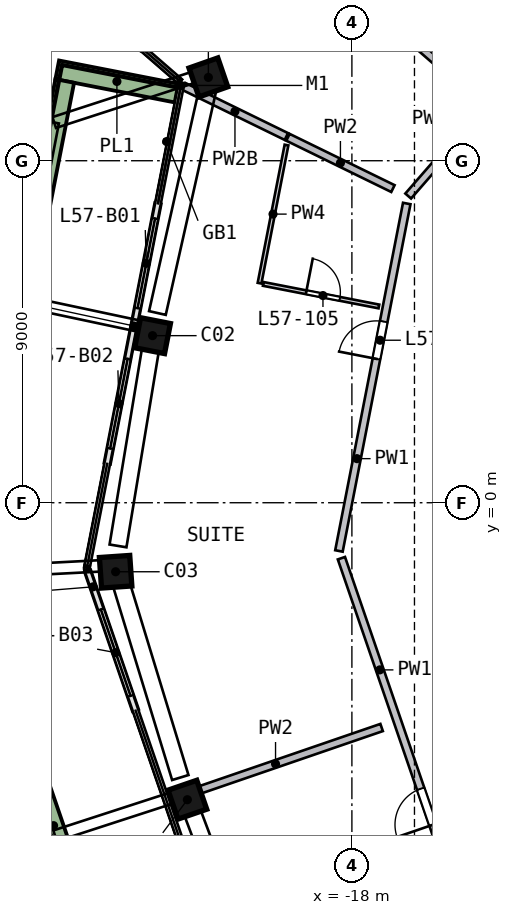
"""IFC4 building model, lengths in metres.
Left out: names, types, materials, properties, quantities, classifications, styles, units other than length and angle.
Written with IfcOpenShell. Run it as: python <this file> out.ifc"""

import sys

from ifc_helpers import new_model, si_unit, direction, frame, frame_2d, origin, origin_2d, place, context, subcontext, project, spatial, rectangle, extrude, element, fill, save


model = new_model("IFC4")
c1 = context("Model", 3, precision=1e-05, world=origin(), true_north=direction((0.0, 1.0)))
c2 = subcontext(c1, "Body", "Model", "MODEL_VIEW")
j1 = project(units=[si_unit("LENGTHUNIT", "METRE"), si_unit("PLANEANGLEUNIT", "RADIAN")], contexts=[c1])
p1 = place(None, origin())
s1 = spatial("IfcSite", under=j1, at=p1, CompositionType="ELEMENT")
p2 = place(p1, origin())
s2 = spatial("IfcBuilding", under=s1, at=p2, CompositionType="ELEMENT")
p3 = place(p2, frame((0.0, 0.0, 234.0)))
s3 = spatial("IfcBuildingStorey", under=s2, at=p3, CompositionType="ELEMENT", Elevation=234.0)
p4 = place(p3, frame((-21.713, 11.318, 0.0), z_axis=(-0.052905921, -0.103683443, 0.993202249), x_axis=(-0.330545328, 0.940345776, 0.080558097)))
e1 = element("IfcColumn", 1, at=p4, inside=s3, PredefinedType="COLUMN", context=c2, shape_type="SweptSolid", body=[
    extrude(rectangle(XDim=0.8, YDim=0.8, at=origin_2d()), origin(), (0.0, 0.0, 1.0), 3.212),
])
p5 = place(p3, frame((-23.22, 4.531, 0.0), z_axis=(-0.020609061, -0.110650124, 0.99364572), x_axis=(-0.190224415, -0.975267855, -0.112549024)))
e2 = element("IfcColumn", 2, at=p5, inside=s3, PredefinedType="COLUMN", context=c2, shape_type="SweptSolid", body=[
    extrude(rectangle(XDim=0.8, YDim=0.8, at=origin_2d()), origin(), (0.0, 0.0, 1.0), 3.21),
])
p6 = place(p3, frame((-24.228, -1.677, 0.0), z_axis=(0.008894671, -0.11509856, 0.993314254), x_axis=(-0.068122893, 0.990975997, 0.115437627)))
e3 = element("IfcColumn", 3, at=p6, inside=s3, PredefinedType="COLUMN", context=c2, shape_type="SweptSolid", body=[
    extrude(rectangle(XDim=0.8, YDim=0.8, at=origin_2d()), origin(), (0.0, 0.0, 1.0), 3.211),
])
p7 = place(p3, frame((-22.375, -7.687, 0.0), z_axis=(0.037491609, -0.106162851, 0.9936417), x_axis=(0.322917335, -0.939706935, -0.112584504)))
e4 = element("IfcColumn", 4, at=p7, inside=s3, PredefinedType="COLUMN", context=c2, shape_type="SweptSolid", body=[
    extrude(rectangle(XDim=0.8, YDim=0.8, at=origin_2d()), origin(), (0.0, 0.0, 1.0), 3.21),
])
p8 = place(p3, frame((-23.104, 7.87, 0.0), z_axis=(0.0, 0.0, 1.0), x_axis=(-0.191532956, -0.981486183, 0.0)))
e5 = element("IfcWall", 5, at=p8, inside=s3, PredefinedType="SOLIDWALL", context=c2, shape_type="SweptSolid", body=[
    extrude(rectangle(XDim=3.3, YDim=0.15, at=frame_2d((1.65, 0.0))), origin(), (0.0, 0.0, 1.0), 2.525),
])
p9 = place(p8, frame((0.4, 0.0, 0.0)))
e6 = element("IfcOpeningElement", 6, at=p9, cuts=e5, PredefinedType="OPENING", context=c2, shape_type="SweptSolid", body=[
    extrude(rectangle(XDim=2.4, YDim=2.4, at=frame_2d((1.2, 1.2))), frame((0.0, 0.085, 0.0), z_axis=(0.0, -1.0, 0.0), x_axis=(1.0, 0.0, 0.0)), (0.0, 0.0, 1.0), 0.17),
])
p10 = place(p3, frame((-23.736, 4.631, 0.0), z_axis=(0.0, 0.0, 1.0), x_axis=(-0.191510359, -0.981490592, 0.0)))
e7 = element("IfcWall", 7, at=p10, inside=s3, PredefinedType="SOLIDWALL", context=c2, shape_type="SweptSolid", body=[
    extrude(rectangle(XDim=3.661, YDim=0.15, at=frame_2d((1.831, 0.0))), origin(), (0.0, 0.0, 1.0), 2.525),
])
p11 = place(p10, frame((0.861, 0.0, 0.0)))
e8 = element("IfcOpeningElement", 8, at=p11, cuts=e7, PredefinedType="OPENING", context=c2, shape_type="SweptSolid", body=[
    extrude(rectangle(XDim=2.4, YDim=2.4, at=frame_2d((1.2, 1.2))), frame((0.0, 0.085, 0.0), z_axis=(0.0, -1.0, 0.0), x_axis=(1.0, 0.0, 0.0)), (0.0, 0.0, 1.0), 0.17),
])
p12 = place(p3, frame((-24.951, -1.805, 0.0), z_axis=(0.0, 0.0, 1.0), x_axis=(0.324897842, -0.945749117, 0.0)))
e9 = element("IfcWall", 9, at=p12, inside=s3, PredefinedType="SOLIDWALL", context=c2, shape_type="SweptSolid", body=[
    extrude(rectangle(XDim=3.863, YDim=0.15, at=frame_2d((1.932, 0.0))), origin(), (0.0, 0.0, 1.0), 2.525),
])
p13 = place(p12, frame((1.063, 0.0, 0.0)))
e10 = element("IfcOpeningElement", 10, at=p13, cuts=e9, PredefinedType="OPENING", context=c2, shape_type="SweptSolid", body=[
    extrude(rectangle(XDim=2.4, YDim=2.4, at=frame_2d((1.2, 1.2))), frame((0.0, 0.085, 0.0), z_axis=(0.0, -1.0, 0.0), x_axis=(1.0, 0.0, 0.0)), (0.0, 0.0, 1.0), 0.17),
])
p14 = place(p3, frame((-22.614, 10.78, 0.0), z_axis=(0.0, 0.0, 1.0), x_axis=(-0.981497239, 0.191476291, 0.0)))
e11 = element("IfcWall", 11, at=p14, inside=s3, PredefinedType="SOLIDWALL", context=c2, shape_type="SweptSolid", body=[
    extrude(rectangle(XDim=3.199, YDim=0.5, at=frame_2d((1.6, 0.0))), origin(), (0.0, 0.0, 1.0), 0.7),
])
p15 = place(p3, frame((-25.556, 11.099, 0.0), z_axis=(0.0, 0.0, 1.0), x_axis=(-0.191494743, -0.981493639, 0.0)))
e12 = element("IfcWall", 12, at=p15, inside=s3, PredefinedType="SOLIDWALL", context=c2, shape_type="SweptSolid", body=[
    extrude(rectangle(XDim=13.223, YDim=0.5, at=frame_2d((6.612, 0.0))), origin(), (0.0, 0.0, 1.0), 0.7),
])
p16 = place(p3, frame((-28.079, -2.009, 0.0), z_axis=(0.0, 0.0, 1.0), x_axis=(0.324897792, -0.945749134, 0.0)))
e13 = element("IfcWall", 13, at=p16, inside=s3, PredefinedType="SOLIDWALL", context=c2, shape_type="SweptSolid", body=[
    extrude(rectangle(XDim=13.724, YDim=0.5, at=frame_2d((6.862, 0.0))), origin(), (0.0, 0.0, 1.0), 0.7),
])
p17 = place(p3, frame((-18.341, -1.269, 0.0), z_axis=(0.0, 0.0, 1.0), x_axis=(0.191492503, 0.981494076, 0.0)))
e14 = element("IfcWall", 14, at=p17, inside=s3, PredefinedType="SOLIDWALL", context=c2, shape_type="SweptSolid", body=[
    extrude(rectangle(XDim=9.316, YDim=0.2, at=frame_2d((4.658, 0.0))), origin(), (0.0, 0.0, 1.0), 3.19),
])
p18 = place(p17, frame((5.15, 0.0, 0.0)))
e15 = element("IfcOpeningElement", 15, at=p18, cuts=e14, PredefinedType="OPENING", context=c2, shape_type="SweptSolid", body=[
    extrude(rectangle(XDim=1.0, YDim=2.1, at=frame_2d((0.5, 1.05))), frame((0.0, 0.11, 0.0), z_axis=(0.0, -1.0, 0.0), x_axis=(1.0, 0.0, 0.0)), (0.0, 0.0, 1.0), 0.22),
])
p19 = place(p3, frame((-15.249, -10.27, 0.0), z_axis=(0.0, 0.0, 1.0), x_axis=(-0.324901791, 0.94574776, 0.0)))
e16 = element("IfcWall", 16, at=p19, inside=s3, PredefinedType="SOLIDWALL", context=c2, shape_type="SweptSolid", body=[
    extrude(rectangle(XDim=9.316, YDim=0.2, at=frame_2d((4.658, 0.0))), origin(), (0.0, 0.0, 1.0), 3.19),
])
p20 = place(p19, frame((1.9, 0.0, 0.0)))
e17 = element("IfcOpeningElement", 17, at=p20, cuts=e16, PredefinedType="OPENING", context=c2, shape_type="SweptSolid", body=[
    extrude(rectangle(XDim=1.0, YDim=2.1, at=frame_2d((0.5, 1.05))), frame((0.0, 0.11, 0.0), z_axis=(0.0, -1.0, 0.0), x_axis=(1.0, 0.0, 0.0)), (0.0, 0.0, 1.0), 0.22),
])
p21 = place(p3, frame((-16.519, 8.071, 0.0), z_axis=(0.0, 0.0, 1.0), x_axis=(0.656586376, 0.754250841, 0.0)))
e18 = element("IfcWall", 18, at=p21, inside=s3, PredefinedType="SOLIDWALL", context=c2, shape_type="SweptSolid", body=[
    extrude(rectangle(XDim=9.517, YDim=0.2, at=frame_2d((4.758, 0.0))), origin(), (0.0, 0.0, 1.0), 3.19),
])
p22 = place(p21, frame((3.861, 0.0, 0.0)))
e19 = element("IfcOpeningElement", 19, at=p22, cuts=e18, PredefinedType="OPENING", context=c2, shape_type="SweptSolid", body=[
    extrude(rectangle(XDim=1.8, YDim=2.1, at=frame_2d((0.9, 1.05))), frame((0.0, 0.11, 0.0), z_axis=(0.0, -1.0, 0.0), x_axis=(1.0, 0.0, 0.0)), (0.0, 0.0, 1.0), 0.22),
])
p23 = place(p3, frame((-19.724, 9.637, 0.0), z_axis=(0.0, 0.0, 1.0), x_axis=(-0.898491673, 0.438990563, 0.0)))
e20 = element("IfcWall", 20, at=p23, inside=s3, PredefinedType="SOLIDWALL", context=c2, shape_type="SweptSolid", body=[
    extrude(rectangle(XDim=3.011, YDim=0.2, at=frame_2d((1.506, 0.0))), origin(), (0.0, 0.0, 1.0), 2.69),
])
p24 = place(p3, frame((-17.218, -5.915, 0.0), z_axis=(0.0, 0.0, 1.0), x_axis=(-0.945735464, -0.324937582, 0.0)))
e21 = element("IfcWall", 21, at=p24, inside=s3, PredefinedType="SOLIDWALL", context=c2, shape_type="SweptSolid", body=[
    extrude(rectangle(XDim=5.903, YDim=0.2, at=frame_2d((2.951, 0.0))), origin(), (0.0, 0.0, 1.0), 3.19),
])
p25 = place(p3, frame((-14.594, 10.586, 0.0), z_axis=(0.0, 0.0, 1.0), x_axis=(-0.754250867, 0.656586346, 0.0)))
e22 = element("IfcWall", 22, at=p25, inside=s3, PredefinedType="SOLIDWALL", context=c2, shape_type="SweptSolid", body=[
    extrude(rectangle(XDim=12.556, YDim=0.2, at=frame_2d((6.278, 0.0))), origin(), (0.0, 0.0, 1.0), 3.19),
])
p26 = place(p25, frame((3.8, 0.0, 0.0)))
e23 = element("IfcOpeningElement", 23, at=p26, cuts=e22, PredefinedType="OPENING", context=c2, shape_type="SweptSolid", body=[
    extrude(rectangle(XDim=1.0, YDim=2.1, at=frame_2d((0.5, 1.05))), frame((0.0, 0.11, 0.0), z_axis=(0.0, -1.0, 0.0), x_axis=(1.0, 0.0, 0.0)), (0.0, 0.0, 1.0), 0.22),
])
p27 = place(p3, frame((-16.92, 8.267, 0.0), z_axis=(0.0, 0.0, 1.0), x_axis=(-0.898471376, 0.439032102, 0.0)))
e24 = element("IfcWall", 24, at=p27, inside=s3, PredefinedType="SOLIDWALL", context=c2, shape_type="SweptSolid", body=[
    extrude(rectangle(XDim=3.075, YDim=0.2, at=frame_2d((1.537, 0.0))), origin(), (0.0, 0.0, 1.0), 3.19),
])
p28 = place(p3, frame((-20.43, 5.778, 0.0), z_axis=(0.0, 0.0, 1.0), x_axis=(0.191550626, 0.981482734, 0.0)))
e25 = element("IfcWall", 25, at=p28, inside=s3, PredefinedType="PARTITIONING", context=c2, shape_type="SweptSolid", body=[
    extrude(rectangle(XDim=3.704, YDim=0.1, at=frame_2d((1.852, 0.0))), origin(), (0.0, 0.0, 1.0), 3.19),
])
p29 = place(p3, frame((-20.332, 5.758, 0.0), z_axis=(0.0, 0.0, 1.0), x_axis=(0.981499618, -0.191464097, 0.0)))
e26 = element("IfcWall", 26, at=p29, inside=s3, PredefinedType="PARTITIONING", context=c2, shape_type="SweptSolid", body=[
    extrude(rectangle(XDim=3.1, YDim=0.1, at=frame_2d((1.55, 0.0))), origin(), (0.0, 0.0, 1.0), 3.19),
])
p30 = place(p29, frame((1.15, 0.0, 0.0)))
e27 = element("IfcOpeningElement", 27, at=p30, cuts=e26, PredefinedType="OPENING", context=c2, shape_type="SweptSolid", body=[
    extrude(rectangle(XDim=0.9, YDim=2.1, at=frame_2d((0.45, 1.05))), frame((0.0, 0.06, 0.0), z_axis=(0.0, -1.0, 0.0), x_axis=(1.0, 0.0, 0.0)), (0.0, 0.0, 1.0), 0.12),
])
p31 = place(p9, origin())
e28 = element("IfcDoor", 28, at=p31, inside=s3, OperationType="SLIDING_TO_RIGHT", PredefinedType="DOOR", context=c2, shape_type="SweptSolid", body=[
    extrude(rectangle(XDim=2.4, YDim=2.4, at=frame_2d((1.2, 1.2))), frame((0.0, 0.025, 0.0), z_axis=(0.0, -1.0, 0.0), x_axis=(1.0, 0.0, 0.0)), (0.0, 0.0, 1.0), 0.05),
])
fill(e6, e28)
p32 = place(p11, origin())
e29 = element("IfcDoor", 29, at=p32, inside=s3, OperationType="SLIDING_TO_LEFT", PredefinedType="DOOR", context=c2, shape_type="SweptSolid", body=[
    extrude(rectangle(XDim=2.4, YDim=2.4, at=frame_2d((1.2, 1.2))), frame((0.0, 0.025, 0.0), z_axis=(0.0, -1.0, 0.0), x_axis=(1.0, 0.0, 0.0)), (0.0, 0.0, 1.0), 0.05),
])
fill(e8, e29)
p33 = place(p13, origin())
e30 = element("IfcDoor", 30, at=p33, inside=s3, OperationType="SLIDING_TO_LEFT", PredefinedType="DOOR", context=c2, shape_type="SweptSolid", body=[
    extrude(rectangle(XDim=2.4, YDim=2.4, at=frame_2d((1.2, 1.2))), frame((0.0, 0.025, 0.0), z_axis=(0.0, -1.0, 0.0), x_axis=(1.0, 0.0, 0.0)), (0.0, 0.0, 1.0), 0.05),
])
fill(e10, e30)
p34 = place(p18, origin())
e31 = element("IfcDoor", 31, at=p34, inside=s3, OperationType="SINGLE_SWING_LEFT", PredefinedType="DOOR", context=c2, shape_type="SweptSolid", body=[
    extrude(rectangle(XDim=1.0, YDim=2.1, at=frame_2d((0.5, 1.05))), frame((0.0, 0.025, 0.0), z_axis=(0.0, -1.0, 0.0), x_axis=(1.0, 0.0, 0.0)), (0.0, 0.0, 1.0), 0.05),
])
fill(e15, e31)
p35 = place(p30, origin())
e32 = element("IfcDoor", 32, at=p35, inside=s3, OperationType="SINGLE_SWING_LEFT", PredefinedType="DOOR", context=c2, shape_type="SweptSolid", body=[
    extrude(rectangle(XDim=0.9, YDim=2.1, at=frame_2d((0.45, 1.05))), frame((0.0, 0.025, 0.0), z_axis=(0.0, -1.0, 0.0), x_axis=(1.0, 0.0, 0.0)), (0.0, 0.0, 1.0), 0.05),
])
fill(e27, e32)
p36 = place(p20, origin())
e33 = element("IfcDoor", 33, at=p36, inside=s3, OperationType="SINGLE_SWING_LEFT", PredefinedType="DOOR", context=c2, shape_type="SweptSolid", body=[
    extrude(rectangle(XDim=1.0, YDim=2.1, at=frame_2d((0.5, 1.05))), frame((0.0, 0.025, 0.0), z_axis=(0.0, -1.0, 0.0), x_axis=(1.0, 0.0, 0.0)), (0.0, 0.0, 1.0), 0.05),
])
fill(e17, e33)
save(model, sys.argv[1])
